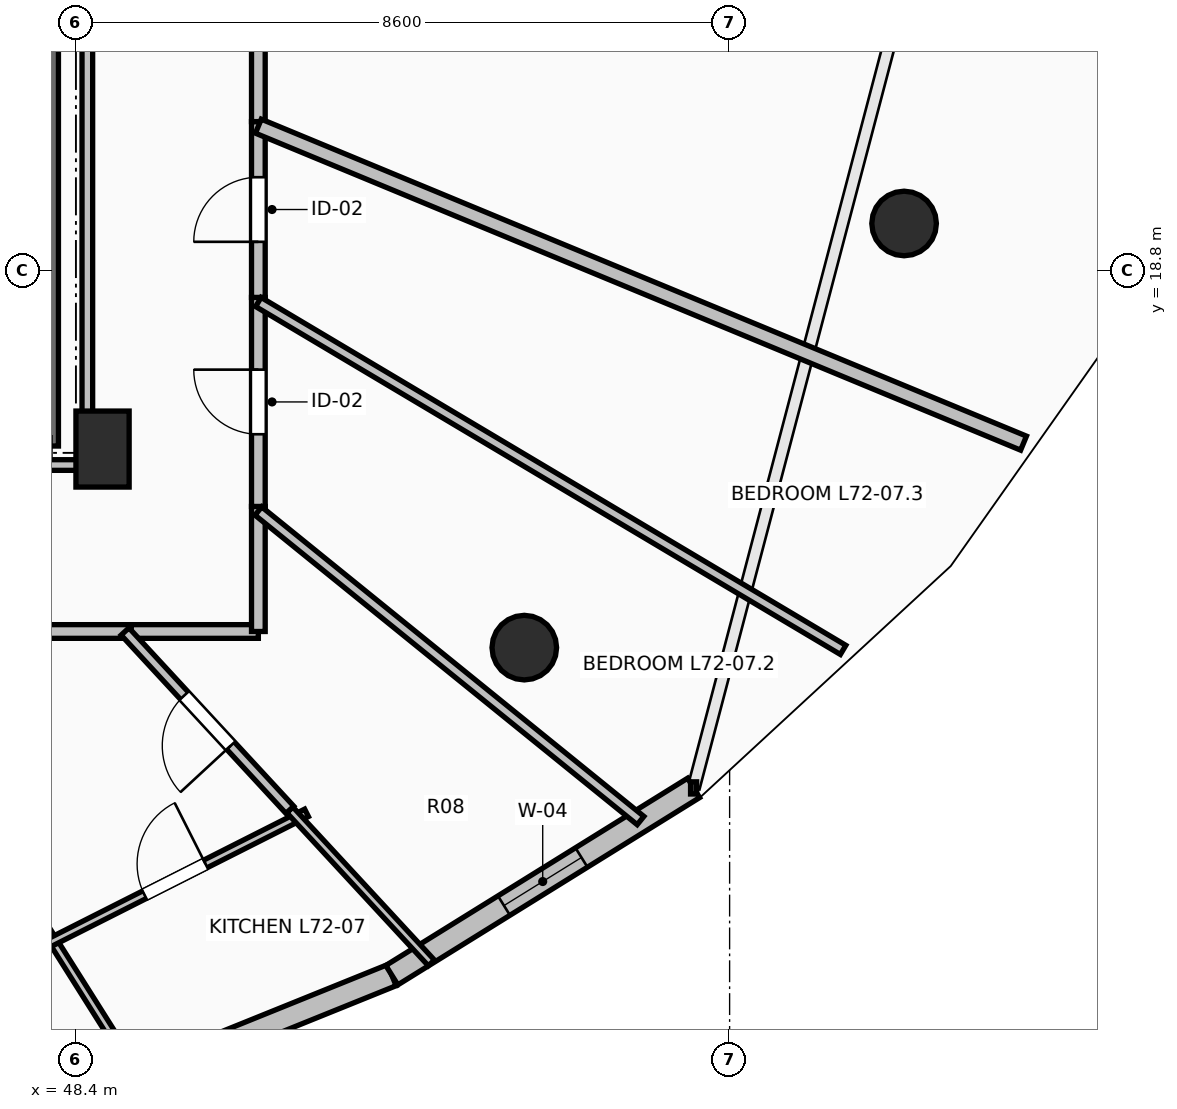
"""IFC4 building model, lengths in metres.
Left out: names, types, materials, properties, quantities, classifications, styles, units other than length and angle.
Written with IfcOpenShell. Run it as: python <this file> out.ifc"""

import sys

from ifc_helpers import new_model, si_unit, direction, frame, frame_2d, origin, origin_2d, place, context, subcontext, project, spatial, rectangle, circle, extrude, element, fill, save


model = new_model("IFC4")
c1 = context("Model", 3, precision=1e-05, world=origin(), true_north=direction((0.0, 1.0)))
c2 = subcontext(c1, "Body", "Model", "MODEL_VIEW")
j1 = project(units=[si_unit("LENGTHUNIT", "METRE"), si_unit("PLANEANGLEUNIT", "RADIAN")], contexts=[c1])
p1 = place(None, origin())
s1 = spatial("IfcSite", under=j1, at=p1, CompositionType="ELEMENT")
p2 = place(p1, origin())
s2 = spatial("IfcBuilding", under=s1, at=p2, CompositionType="ELEMENT")
p3 = place(p2, frame((0.0, 0.0, 266.2)))
s3 = spatial("IfcBuildingStorey", under=s2, at=p3, CompositionType="ELEMENT", Elevation=266.2)
for number, where, z_axis, x_axis in (
    (1, (54.299, 13.838, 0.0), (0.0, 0.0, 1.0), (0.707, -0.707, 0.0)),
    (2, (59.295, 19.418, 0.0), (0.0, 0.0, 1.0), (0.924, -0.383, 0.0)),
):
    element("IfcColumn", number, at=place(p3, frame(where, z_axis=z_axis, x_axis=x_axis)), inside=s3, PredefinedType="COLUMN", context=c2, shape_type="SweptSolid", body=[
        extrude(circle(Radius=0.425, at=origin_2d()), origin(), (0.0, 0.0, 1.0), 3.55),
    ])
p4 = place(p3, frame((48.75, 16.45, 0.0), z_axis=(0.0, 0.0, 1.0), x_axis=(1.0, 0.0, 0.0)))
e3 = element("IfcColumn", 3, at=p4, inside=s3, PredefinedType="PILASTER", context=c2, shape_type="SweptSolid", body=[
    extrude(rectangle(XDim=0.7, YDim=1.0, at=origin_2d()), origin(), (0.0, 0.0, 1.0), 3.55),
])
p5 = place(p3, frame((48.026, 7.698, 0.0), z_axis=(0.0, 0.0, 1.0), x_axis=(0.927147375511, 0.374696869594, 0.0)))
e4 = element("IfcWall", 4, at=p5, inside=s3, PredefinedType="STANDARD", context=c2, shape_type="SweptSolid", body=[
    extrude(rectangle(XDim=4.885, YDim=0.3, at=frame_2d((2.443, 0.0))), origin(), (0.0, 0.0, 1.0), 3.29),
])
p6 = place(p3, frame((52.556, 9.529, 0.0), z_axis=(0.0, 0.0, 1.0), x_axis=(0.849702323036, 0.527262707032, 0.0)))
e5 = element("IfcWall", 5, at=p6, inside=s3, PredefinedType="STANDARD", context=c2, shape_type="SweptSolid", body=[
    extrude(rectangle(XDim=4.672, YDim=0.3, at=frame_2d((2.336, 0.0))), origin(), (0.0, 0.0, 1.0), 3.29),
])
p7 = place(p6, frame((1.736, 0.0, 0.85)))
e6 = element("IfcOpeningElement", 6, at=p7, cuts=e5, PredefinedType="OPENING", context=c2, shape_type="SweptSolid", body=[
    extrude(rectangle(XDim=1.2, YDim=1.95, at=frame_2d((0.6, 0.975))), frame((0.0, 0.165, 0.0), z_axis=(0.0, -1.0, 0.0), x_axis=(1.0, 0.0, 0.0)), (0.0, 0.0, 1.0), 0.33),
])
p8 = place(p3, frame((48.06, 23.91, 0.0), z_axis=(0.0, 0.0, 1.0), x_axis=(0.0, -1.0, 0.0)))
e7 = element("IfcWall", 7, at=p8, inside=s3, PredefinedType="SOLIDWALL", context=c2, shape_type="SweptSolid", body=[
    extrude(rectangle(XDim=7.42, YDim=0.22, at=frame_2d((3.71, 0.0))), origin(), (0.0, 0.0, 1.0), 3.29),
])
p9 = place(p3, frame((45.237, 14.05, 0.0), z_axis=(0.0, 0.0, 1.0), x_axis=(1.0, 0.0, 0.0)))
e8 = element("IfcWall", 8, at=p9, inside=s3, PredefinedType="PARTITIONING", context=c2, shape_type="SweptSolid", body=[
    extrude(rectangle(XDim=3.891, YDim=0.18, at=frame_2d((1.945, 0.0))), origin(), (0.0, 0.0, 1.0), 2.482),
])
p10 = place(p9, frame((1.446, 0.0, 0.0)))
e9 = element("IfcOpeningElement", 9, at=p10, cuts=e8, PredefinedType="OPENING", context=c2, shape_type="SweptSolid", body=[
    extrude(rectangle(XDim=1.0, YDim=2.15, at=frame_2d((0.5, 1.075))), frame((0.0, 0.105, 0.0), z_axis=(0.0, -1.0, 0.0), x_axis=(1.0, 0.0, 0.0)), (0.0, 0.0, 1.0), 0.21),
])
p11 = place(p3, frame((49.128, 14.05, 0.0), z_axis=(0.0, 0.0, 1.0), x_axis=(1.0, 0.0, 0.0)))
e10 = element("IfcWall", 10, at=p11, inside=s3, PredefinedType="PARTITIONING", context=c2, shape_type="SweptSolid", body=[
    extrude(rectangle(XDim=1.672, YDim=0.18, at=frame_2d((0.836, 0.0))), origin(), (0.0, 0.0, 1.0), 2.936),
])
p12 = place(p3, frame((50.8, 14.05, 0.0), z_axis=(0.0, 0.0, 1.0), x_axis=(0.0, 1.0, 0.0)))
e11 = element("IfcWall", 11, at=p12, inside=s3, PredefinedType="PARTITIONING", context=c2, shape_type="SweptSolid", body=[
    extrude(rectangle(XDim=1.645, YDim=0.18, at=frame_2d((0.823, 0.0))), origin(), (0.0, 0.0, 1.0), 2.482),
])
p13 = place(p3, frame((50.8, 15.695, 0.0), z_axis=(0.0, 0.0, 1.0), x_axis=(0.0, 1.0, 0.0)))
e12 = element("IfcWall", 12, at=p13, inside=s3, PredefinedType="PARTITIONING", context=c2, shape_type="SweptSolid", body=[
    extrude(rectangle(XDim=2.75, YDim=0.18, at=frame_2d((1.375, 0.0))), origin(), (0.0, 0.0, 1.0), 2.482),
])
p14 = place(p13, frame((0.95, 0.0, 0.0)))
e13 = element("IfcOpeningElement", 13, at=p14, cuts=e12, PredefinedType="OPENING", context=c2, shape_type="SweptSolid", body=[
    extrude(rectangle(XDim=0.85, YDim=2.1, at=frame_2d((0.425, 1.05))), frame((0.0, 0.105, 0.0), z_axis=(0.0, -1.0, 0.0), x_axis=(1.0, 0.0, 0.0)), (0.0, 0.0, 1.0), 0.21),
])
p15 = place(p3, frame((50.8, 18.445, 0.0), z_axis=(0.0, 0.0, 1.0), x_axis=(0.0, 1.0, 0.0)))
e14 = element("IfcWall", 14, at=p15, inside=s3, PredefinedType="PARTITIONING", context=c2, shape_type="SweptSolid", body=[
    extrude(rectangle(XDim=2.313, YDim=0.18, at=frame_2d((1.156, 0.0))), origin(), (0.0, 0.0, 1.0), 3.29),
])
p16 = place(p15, frame((0.731, 0.0, 0.0)))
e15 = element("IfcOpeningElement", 15, at=p16, cuts=e14, PredefinedType="OPENING", context=c2, shape_type="SweptSolid", body=[
    extrude(rectangle(XDim=0.85, YDim=2.1, at=frame_2d((0.425, 1.05))), frame((0.0, 0.105, 0.0), z_axis=(0.0, -1.0, 0.0), x_axis=(1.0, 0.0, 0.0)), (0.0, 0.0, 1.0), 0.21),
])
p17 = place(p3, frame((50.8, 20.758, 0.0), z_axis=(0.0, 0.0, 1.0), x_axis=(0.0, 1.0, 0.0)))
e16 = element("IfcWall", 16, at=p17, inside=s3, PredefinedType="PARTITIONING", context=c2, shape_type="SweptSolid", body=[
    extrude(rectangle(XDim=10.344, YDim=0.18, at=frame_2d((5.172, 0.0))), origin(), (0.0, 0.0, 1.0), 2.482),
])
p18 = place(p17, frame((4.672, 0.0, 0.0)))
e17 = element("IfcOpeningElement", 17, at=p18, cuts=e16, PredefinedType="OPENING", context=c2, shape_type="SweptSolid", body=[
    extrude(rectangle(XDim=1.0, YDim=2.15, at=frame_2d((0.5, 1.075))), frame((0.0, 0.105, 0.0), z_axis=(0.0, -1.0, 0.0), x_axis=(1.0, 0.0, 0.0)), (0.0, 0.0, 1.0), 0.21),
])
p19 = place(p3, frame((49.303, 8.067, 0.0), z_axis=(0.0, 0.0, 1.0), x_axis=(-0.53356042882, 0.845761945702, 0.0)))
e18 = element("IfcWall", 18, at=p19, inside=s3, PredefinedType="PARTITIONING", context=c2, shape_type="SweptSolid", body=[
    extrude(rectangle(XDim=2.4, YDim=0.11, at=frame_2d((1.2, 0.0))), origin(), (0.0, 0.0, 1.0), 3.29),
])
p20 = place(p3, frame((47.972, 9.915, 0.0), z_axis=(0.0, 0.0, 1.0), x_axis=(0.892543730476, 0.450960851059, 0.0)))
e19 = element("IfcWall", 19, at=p20, inside=s3, PredefinedType="PARTITIONING", context=c2, shape_type="SweptSolid", body=[
    extrude(rectangle(XDim=3.879, YDim=0.11, at=frame_2d((1.939, 0.0))), origin(), (0.0, 0.0, 1.0), 3.29),
])
p21 = place(p20, frame((1.49, 0.0, 0.0)))
e20 = element("IfcOpeningElement", 20, at=p21, cuts=e19, PredefinedType="OPENING", context=c2, shape_type="SweptSolid", body=[
    extrude(rectangle(XDim=0.9, YDim=2.1, at=frame_2d((0.45, 1.05))), frame((0.0, 0.07, 0.0), z_axis=(0.0, -1.0, 0.0), x_axis=(1.0, 0.0, 0.0)), (0.0, 0.0, 1.0), 0.14),
])
p22 = place(p3, frame((51.214, 11.704, 0.0), z_axis=(0.0, 0.0, 1.0), x_axis=(0.678974823397, -0.734161555241, 0.0)))
e21 = element("IfcWall", 21, at=p22, inside=s3, PredefinedType="PARTITIONING", context=c2, shape_type="SweptSolid", body=[
    extrude(rectangle(XDim=2.743, YDim=0.11, at=frame_2d((1.372, 0.0))), origin(), (0.0, 0.0, 1.0), 3.29),
])
p23 = place(p3, frame((51.214, 11.704, 0.0), z_axis=(0.0, 0.0, 1.0), x_axis=(-0.678781449794, 0.734340345763, 0.0)))
e22 = element("IfcWall", 22, at=p23, inside=s3, PredefinedType="PARTITIONING", context=c2, shape_type="SweptSolid", body=[
    extrude(rectangle(XDim=3.195, YDim=0.14, at=frame_2d((1.597, 0.0))), origin(), (0.0, 0.0, 1.0), 2.874),
])
p24 = place(p23, frame((1.147, 0.0, 0.0)))
e23 = element("IfcOpeningElement", 23, at=p24, cuts=e22, PredefinedType="OPENING", context=c2, shape_type="SweptSolid", body=[
    extrude(rectangle(XDim=0.9, YDim=2.1, at=frame_2d((0.45, 1.05))), frame((0.0, 0.085, 0.0), z_axis=(0.0, -1.0, 0.0), x_axis=(1.0, 0.0, 0.0)), (0.0, 0.0, 1.0), 0.17),
])
p25 = place(p3, frame((55.828, 11.563, 0.0), z_axis=(0.0, 0.0, 1.0), x_axis=(-0.777103372697, 0.62937298015, 0.0)))
e24 = element("IfcWall", 24, at=p25, inside=s3, PredefinedType="PARTITIONING", context=c2, shape_type="SweptSolid", body=[
    extrude(rectangle(XDim=6.47, YDim=0.14, at=frame_2d((3.235, 0.0))), origin(), (0.0, 0.0, 1.0), 2.482),
])
p26 = place(p3, frame((58.493, 13.808, 0.0), z_axis=(0.0, 0.0, 1.0), x_axis=(-0.859400180079, 0.511303560011, 0.0)))
e25 = element("IfcWall", 25, at=p26, inside=s3, PredefinedType="PARTITIONING", context=c2, shape_type="SweptSolid", body=[
    extrude(rectangle(XDim=8.951, YDim=0.14, at=frame_2d((4.476, 0.0))), origin(), (0.0, 0.0, 1.0), 2.874),
])
p27 = place(p3, frame((60.867, 16.528, 0.0), z_axis=(0.0, 0.0, 1.0), x_axis=(-0.923877013663, 0.382689513347, 0.0)))
e26 = element("IfcWall", 26, at=p27, inside=s3, PredefinedType="PARTITIONING", context=c2, shape_type="SweptSolid", body=[
    extrude(rectangle(XDim=10.896, YDim=0.2, at=frame_2d((5.448, 0.0))), origin(), (0.0, 0.0, 1.0), 2.874),
])
p28 = place(p3, frame((44.805, 16.24, 0.0), z_axis=(0.0, 0.0, 1.0), x_axis=(1.0, 0.0, 0.0)))
e27 = element("IfcWall", 27, at=p28, inside=s3, PredefinedType="PARTITIONING", context=c2, shape_type="SweptSolid", body=[
    extrude(rectangle(XDim=3.745, YDim=0.14, at=frame_2d((1.873, 0.0))), origin(), (0.0, 0.0, 1.0), 2.482),
])
p29 = place(p3, frame((48.55, 16.24, 0.0), z_axis=(0.0, 0.0, 1.0), x_axis=(0.0, 1.0, 0.0)))
e28 = element("IfcWall", 28, at=p29, inside=s3, PredefinedType="PARTITIONING", context=c2, shape_type="SweptSolid", body=[
    extrude(rectangle(XDim=7.514, YDim=0.14, at=frame_2d((3.757, 0.0))), origin(), (0.0, 0.0, 1.0), 2.482),
])
p30 = place(p7, origin())
e29 = element("IfcWindow", 29, at=p30, inside=s3, PartitioningType="SINGLE_PANEL", PredefinedType="WINDOW", context=c2, shape_type="SweptSolid", body=[
    extrude(rectangle(XDim=1.2, YDim=1.95, at=frame_2d((0.6, 0.975))), frame((0.0, 0.03, 0.0), z_axis=(0.0, -1.0, 0.0), x_axis=(1.0, 0.0, 0.0)), (0.0, 0.0, 1.0), 0.06),
])
fill(e6, e29)
p31 = place(p21, origin())
e30 = element("IfcDoor", 30, at=p31, inside=s3, OperationType="SINGLE_SWING_RIGHT", PredefinedType="DOOR", context=c2, shape_type="SweptSolid", body=[
    extrude(rectangle(XDim=0.9, YDim=2.1, at=frame_2d((0.45, 1.05))), frame((0.0, 0.025, 0.0), z_axis=(0.0, -1.0, 0.0), x_axis=(1.0, 0.0, 0.0)), (0.0, 0.0, 1.0), 0.05),
])
fill(e20, e30)
p32 = place(p24, origin())
e31 = element("IfcDoor", 31, at=p32, inside=s3, OperationType="SINGLE_SWING_LEFT", PredefinedType="DOOR", context=c2, shape_type="SweptSolid", body=[
    extrude(rectangle(XDim=0.9, YDim=2.1, at=frame_2d((0.45, 1.05))), frame((0.0, 0.025, 0.0), z_axis=(0.0, -1.0, 0.0), x_axis=(1.0, 0.0, 0.0)), (0.0, 0.0, 1.0), 0.05),
])
fill(e23, e31)
p33 = place(p14, origin())
e32 = element("IfcDoor", 32, at=p33, inside=s3, OperationType="SINGLE_SWING_RIGHT", PredefinedType="DOOR", context=c2, shape_type="SweptSolid", body=[
    extrude(rectangle(XDim=0.85, YDim=2.1, at=frame_2d((0.425, 1.05))), frame((0.0, 0.025, 0.0), z_axis=(0.0, -1.0, 0.0), x_axis=(1.0, 0.0, 0.0)), (0.0, 0.0, 1.0), 0.05),
])
fill(e13, e32)
p34 = place(p16, origin())
e33 = element("IfcDoor", 33, at=p34, inside=s3, OperationType="SINGLE_SWING_LEFT", PredefinedType="DOOR", context=c2, shape_type="SweptSolid", body=[
    extrude(rectangle(XDim=0.85, YDim=2.1, at=frame_2d((0.425, 1.05))), frame((0.0, 0.025, 0.0), z_axis=(0.0, -1.0, 0.0), x_axis=(1.0, 0.0, 0.0)), (0.0, 0.0, 1.0), 0.05),
])
fill(e15, e33)
save(model, sys.argv[1])
